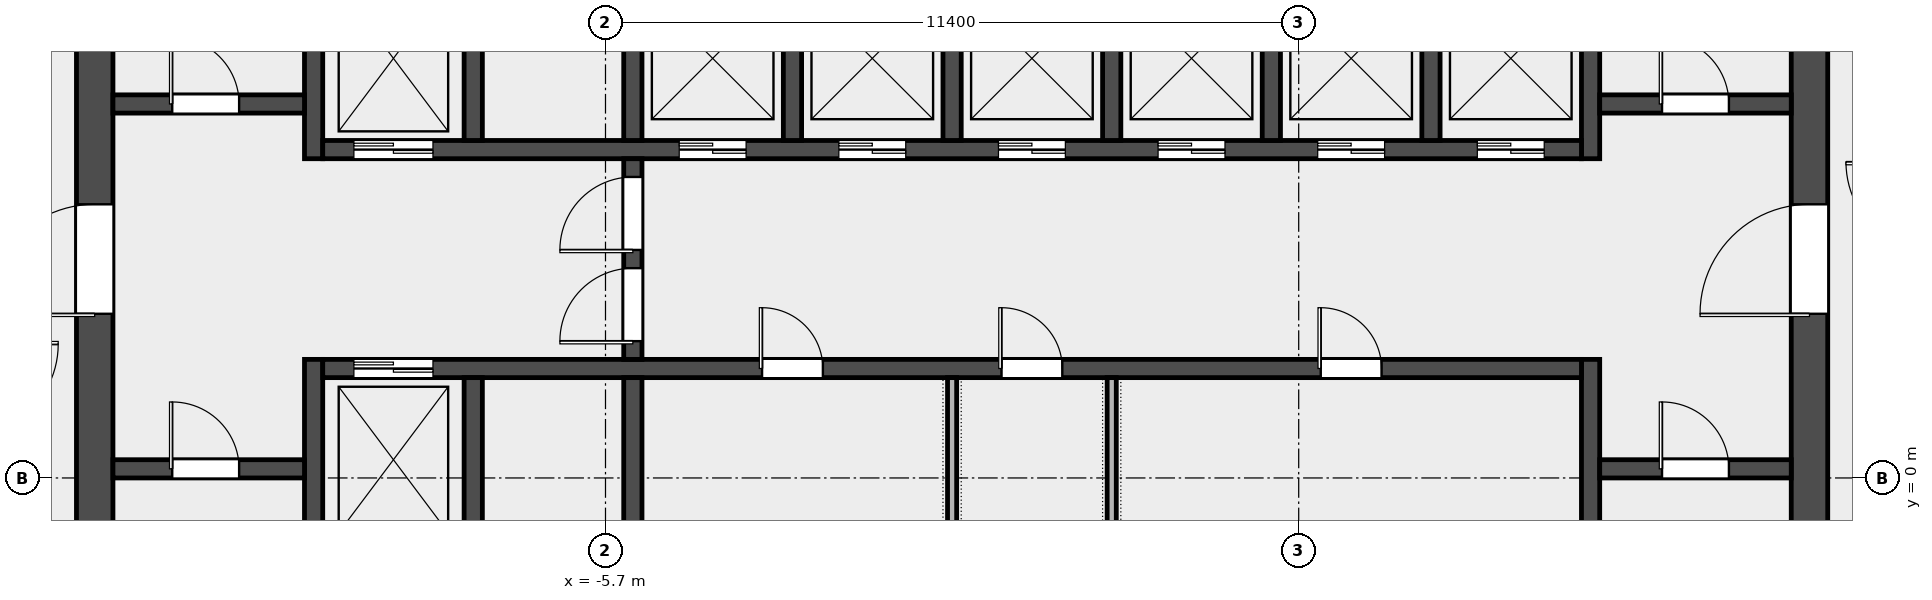
"""IFC4 building model, lengths in metres.
Left out: names, types, materials, properties, quantities, classifications, styles, units other than length and angle.
Written with IfcOpenShell. Run it as: python <this file> out.ifc"""

import sys

from ifc_helpers import new_model, si_unit, direction, frame, frame_2d, origin, place, context, subcontext, project, spatial, rectangle, extrude, element, fill, save


model = new_model("IFC4")
c1 = context("Model", 3, precision=1e-05, world=origin(), true_north=direction((0.0, 1.0)))
c2 = subcontext(c1, "Body", "Model", "MODEL_VIEW")
j1 = project(units=[si_unit("LENGTHUNIT", "METRE"), si_unit("PLANEANGLEUNIT", "RADIAN")], contexts=[c1])
p1 = place(None, origin())
s1 = spatial("IfcSite", under=j1, at=p1, CompositionType="ELEMENT")
p2 = place(p1, origin())
s2 = spatial("IfcBuilding", under=s1, at=p2, CompositionType="ELEMENT")
p3 = place(p2, frame((0.0, 0.0, 311.4)))
s3 = spatial("IfcBuildingStorey", under=s2, at=p3, CompositionType="ELEMENT", Elevation=311.4)
p4 = place(p3, frame((-14.1, -6.6, 0.0), z_axis=(0.0, 0.0, 1.0), x_axis=(0.0, 1.0, 0.0)))
e1 = element("IfcWall", 1, at=p4, inside=s3, PredefinedType="SHEAR", context=c2, shape_type="SweptSolid", body=[
    extrude(rectangle(XDim=19.5, YDim=0.6, at=frame_2d((9.75, 0.0))), origin(), (0.0, 0.0, 1.0), 3.7),
])
p5 = place(p4, frame((9.3, 0.0, 0.0)))
e2 = element("IfcOpeningElement", 2, at=p5, cuts=e1, PredefinedType="OPENING", context=c2, shape_type="SweptSolid", body=[
    extrude(rectangle(XDim=1.8, YDim=2.1, at=frame_2d((0.9, 1.05))), frame((0.0, 0.312, 0.0), z_axis=(0.0, -1.0, 0.0), x_axis=(1.0, 0.0, 0.0)), (0.0, 0.0, 1.0), 0.624),
])
p6 = place(p3, frame((14.1, -6.6, 0.0), z_axis=(0.0, 0.0, 1.0), x_axis=(0.0, 1.0, 0.0)))
e3 = element("IfcWall", 3, at=p6, inside=s3, PredefinedType="SHEAR", context=c2, shape_type="SweptSolid", body=[
    extrude(rectangle(XDim=19.5, YDim=0.6, at=frame_2d((9.75, 0.0))), origin(), (0.0, 0.0, 1.0), 3.7),
])
p7 = place(p6, frame((9.3, 0.0, 0.0)))
e4 = element("IfcOpeningElement", 4, at=p7, cuts=e3, PredefinedType="OPENING", context=c2, shape_type="SweptSolid", body=[
    extrude(rectangle(XDim=1.8, YDim=2.1, at=frame_2d((0.9, 1.05))), frame((0.0, 0.312, 0.0), z_axis=(0.0, -1.0, 0.0), x_axis=(1.0, 0.0, 0.0)), (0.0, 0.0, 1.0), 0.624),
])
p8 = place(p3, frame((-10.5, -6.6, 0.0), z_axis=(0.0, 0.0, 1.0), x_axis=(0.0, 1.0, 0.0)))
e5 = element("IfcWall", 5, at=p8, inside=s3, PredefinedType="SHEAR", context=c2, shape_type="SweptSolid", body=[
    extrude(rectangle(XDim=8.55, YDim=0.3, at=frame_2d((4.275, 0.0))), origin(), (0.0, 0.0, 1.0), 3.7),
])
p9 = place(p3, frame((-10.5, 5.25, 0.0), z_axis=(0.0, 0.0, 1.0), x_axis=(0.0, 1.0, 0.0)))
e6 = element("IfcWall", 6, at=p9, inside=s3, PredefinedType="SHEAR", context=c2, shape_type="SweptSolid", body=[
    extrude(rectangle(XDim=7.65, YDim=0.3, at=frame_2d((3.825, 0.0))), origin(), (0.0, 0.0, 1.0), 3.7),
])
p10 = place(p3, frame((10.5, -6.6, 0.0), z_axis=(0.0, 0.0, 1.0), x_axis=(0.0, 1.0, 0.0)))
e7 = element("IfcWall", 7, at=p10, inside=s3, PredefinedType="SHEAR", context=c2, shape_type="SweptSolid", body=[
    extrude(rectangle(XDim=8.55, YDim=0.3, at=frame_2d((4.275, 0.0))), origin(), (0.0, 0.0, 1.0), 3.7),
])
p11 = place(p3, frame((10.5, 5.25, 0.0), z_axis=(0.0, 0.0, 1.0), x_axis=(0.0, 1.0, 0.0)))
e8 = element("IfcWall", 8, at=p11, inside=s3, PredefinedType="SHEAR", context=c2, shape_type="SweptSolid", body=[
    extrude(rectangle(XDim=7.65, YDim=0.3, at=frame_2d((3.825, 0.0))), origin(), (0.0, 0.0, 1.0), 3.7),
])
p12 = place(p3, frame((-13.8, 0.15, 0.0), z_axis=(0.0, 0.0, 1.0), x_axis=(1.0, 0.0, 0.0)))
e9 = element("IfcWall", 9, at=p12, inside=s3, PredefinedType="SOLIDWALL", context=c2, shape_type="SweptSolid", body=[
    extrude(rectangle(XDim=3.15, YDim=0.3, at=frame_2d((1.575, 0.0))), origin(), (0.0, 0.0, 1.0), 3.7),
])
p13 = place(p12, frame((0.975, 0.0, 0.0)))
e10 = element("IfcOpeningElement", 10, at=p13, cuts=e9, PredefinedType="OPENING", context=c2, shape_type="SweptSolid", body=[
    extrude(rectangle(XDim=1.1, YDim=2.1, at=frame_2d((0.55, 1.05))), frame((0.0, 0.162, 0.0), z_axis=(0.0, -1.0, 0.0), x_axis=(1.0, 0.0, 0.0)), (0.0, 0.0, 1.0), 0.324),
])
p14 = place(p3, frame((-13.8, 6.15, 0.0), z_axis=(0.0, 0.0, 1.0), x_axis=(1.0, 0.0, 0.0)))
e11 = element("IfcWall", 11, at=p14, inside=s3, PredefinedType="SOLIDWALL", context=c2, shape_type="SweptSolid", body=[
    extrude(rectangle(XDim=3.15, YDim=0.3, at=frame_2d((1.575, 0.0))), origin(), (0.0, 0.0, 1.0), 3.7),
])
p15 = place(p14, frame((0.975, 0.0, 0.0)))
e12 = element("IfcOpeningElement", 12, at=p15, cuts=e11, PredefinedType="OPENING", context=c2, shape_type="SweptSolid", body=[
    extrude(rectangle(XDim=1.1, YDim=2.1, at=frame_2d((0.55, 1.05))), frame((0.0, 0.162, 0.0), z_axis=(0.0, -1.0, 0.0), x_axis=(1.0, 0.0, 0.0)), (0.0, 0.0, 1.0), 0.324),
])
p16 = place(p3, frame((10.65, 0.15, 0.0), z_axis=(0.0, 0.0, 1.0), x_axis=(1.0, 0.0, 0.0)))
e13 = element("IfcWall", 13, at=p16, inside=s3, PredefinedType="SOLIDWALL", context=c2, shape_type="SweptSolid", body=[
    extrude(rectangle(XDim=3.15, YDim=0.3, at=frame_2d((1.575, 0.0))), origin(), (0.0, 0.0, 1.0), 3.7),
])
p17 = place(p16, frame((1.025, 0.0, 0.0)))
e14 = element("IfcOpeningElement", 14, at=p17, cuts=e13, PredefinedType="OPENING", context=c2, shape_type="SweptSolid", body=[
    extrude(rectangle(XDim=1.1, YDim=2.1, at=frame_2d((0.55, 1.05))), frame((0.0, 0.162, 0.0), z_axis=(0.0, -1.0, 0.0), x_axis=(1.0, 0.0, 0.0)), (0.0, 0.0, 1.0), 0.324),
])
p18 = place(p3, frame((10.65, 6.15, 0.0), z_axis=(0.0, 0.0, 1.0), x_axis=(1.0, 0.0, 0.0)))
e15 = element("IfcWall", 15, at=p18, inside=s3, PredefinedType="SOLIDWALL", context=c2, shape_type="SweptSolid", body=[
    extrude(rectangle(XDim=3.15, YDim=0.3, at=frame_2d((1.575, 0.0))), origin(), (0.0, 0.0, 1.0), 3.7),
])
p19 = place(p18, frame((1.025, 0.0, 0.0)))
e16 = element("IfcOpeningElement", 16, at=p19, cuts=e15, PredefinedType="OPENING", context=c2, shape_type="SweptSolid", body=[
    extrude(rectangle(XDim=1.1, YDim=2.1, at=frame_2d((0.55, 1.05))), frame((0.0, 0.162, 0.0), z_axis=(0.0, -1.0, 0.0), x_axis=(1.0, 0.0, 0.0)), (0.0, 0.0, 1.0), 0.324),
])
p20 = place(p3, frame((-10.35, 1.8, 0.0), z_axis=(0.0, 0.0, 1.0), x_axis=(1.0, 0.0, 0.0)))
e17 = element("IfcWall", 17, at=p20, inside=s3, PredefinedType="SOLIDWALL", context=c2, shape_type="SweptSolid", body=[
    extrude(rectangle(XDim=20.7, YDim=0.3, at=frame_2d((10.35, 0.0))), origin(), (0.0, 0.0, 1.0), 3.7),
])
p21 = place(p20, frame((0.512, 0.0, 0.0)))
e18 = element("IfcOpeningElement", 18, at=p21, cuts=e17, PredefinedType="OPENING", context=c2, shape_type="SweptSolid", body=[
    extrude(rectangle(XDim=1.3, YDim=2.1, at=frame_2d((0.65, 1.05))), frame((0.0, 0.162, 0.0), z_axis=(0.0, -1.0, 0.0), x_axis=(1.0, 0.0, 0.0)), (0.0, 0.0, 1.0), 0.324),
])
p22 = place(p20, frame((7.225, 0.0, 0.0)))
e19 = element("IfcOpeningElement", 19, at=p22, cuts=e17, PredefinedType="OPENING", context=c2, shape_type="SweptSolid", body=[
    extrude(rectangle(XDim=1.0, YDim=2.1, at=frame_2d((0.5, 1.05))), frame((0.0, 0.162, 0.0), z_axis=(0.0, -1.0, 0.0), x_axis=(1.0, 0.0, 0.0)), (0.0, 0.0, 1.0), 0.324),
])
p23 = place(p20, frame((11.163, 0.0, 0.0)))
e20 = element("IfcOpeningElement", 20, at=p23, cuts=e17, PredefinedType="OPENING", context=c2, shape_type="SweptSolid", body=[
    extrude(rectangle(XDim=1.0, YDim=2.1, at=frame_2d((0.5, 1.05))), frame((0.0, 0.162, 0.0), z_axis=(0.0, -1.0, 0.0), x_axis=(1.0, 0.0, 0.0)), (0.0, 0.0, 1.0), 0.324),
])
p24 = place(p20, frame((16.413, 0.0, 0.0)))
e21 = element("IfcOpeningElement", 21, at=p24, cuts=e17, PredefinedType="OPENING", context=c2, shape_type="SweptSolid", body=[
    extrude(rectangle(XDim=1.0, YDim=2.1, at=frame_2d((0.5, 1.05))), frame((0.0, 0.162, 0.0), z_axis=(0.0, -1.0, 0.0), x_axis=(1.0, 0.0, 0.0)), (0.0, 0.0, 1.0), 0.324),
])
p25 = place(p3, frame((-10.35, 5.4, 0.0), z_axis=(0.0, 0.0, 1.0), x_axis=(1.0, 0.0, 0.0)))
e22 = element("IfcWall", 22, at=p25, inside=s3, PredefinedType="SOLIDWALL", context=c2, shape_type="SweptSolid", body=[
    extrude(rectangle(XDim=20.7, YDim=0.3, at=frame_2d((10.35, 0.0))), origin(), (0.0, 0.0, 1.0), 3.7),
])
p26 = place(p25, frame((0.512, 0.0, 0.0)))
e23 = element("IfcOpeningElement", 23, at=p26, cuts=e22, PredefinedType="OPENING", context=c2, shape_type="SweptSolid", body=[
    extrude(rectangle(XDim=1.3, YDim=2.1, at=frame_2d((0.65, 1.05))), frame((0.0, 0.162, 0.0), z_axis=(0.0, -1.0, 0.0), x_axis=(1.0, 0.0, 0.0)), (0.0, 0.0, 1.0), 0.324),
])
p27 = place(p25, frame((5.863, 0.0, 0.0)))
e24 = element("IfcOpeningElement", 24, at=p27, cuts=e22, PredefinedType="OPENING", context=c2, shape_type="SweptSolid", body=[
    extrude(rectangle(XDim=1.1, YDim=2.1, at=frame_2d((0.55, 1.05))), frame((0.0, 0.162, 0.0), z_axis=(0.0, -1.0, 0.0), x_axis=(1.0, 0.0, 0.0)), (0.0, 0.0, 1.0), 0.324),
])
p28 = place(p25, frame((8.488, 0.0, 0.0)))
e25 = element("IfcOpeningElement", 25, at=p28, cuts=e22, PredefinedType="OPENING", context=c2, shape_type="SweptSolid", body=[
    extrude(rectangle(XDim=1.1, YDim=2.1, at=frame_2d((0.55, 1.05))), frame((0.0, 0.162, 0.0), z_axis=(0.0, -1.0, 0.0), x_axis=(1.0, 0.0, 0.0)), (0.0, 0.0, 1.0), 0.324),
])
p29 = place(p25, frame((11.113, 0.0, 0.0)))
e26 = element("IfcOpeningElement", 26, at=p29, cuts=e22, PredefinedType="OPENING", context=c2, shape_type="SweptSolid", body=[
    extrude(rectangle(XDim=1.1, YDim=2.1, at=frame_2d((0.55, 1.05))), frame((0.0, 0.162, 0.0), z_axis=(0.0, -1.0, 0.0), x_axis=(1.0, 0.0, 0.0)), (0.0, 0.0, 1.0), 0.324),
])
p30 = place(p25, frame((13.738, 0.0, 0.0)))
e27 = element("IfcOpeningElement", 27, at=p30, cuts=e22, PredefinedType="OPENING", context=c2, shape_type="SweptSolid", body=[
    extrude(rectangle(XDim=1.1, YDim=2.1, at=frame_2d((0.55, 1.05))), frame((0.0, 0.162, 0.0), z_axis=(0.0, -1.0, 0.0), x_axis=(1.0, 0.0, 0.0)), (0.0, 0.0, 1.0), 0.324),
])
p31 = place(p25, frame((16.363, 0.0, 0.0)))
e28 = element("IfcOpeningElement", 28, at=p31, cuts=e22, PredefinedType="OPENING", context=c2, shape_type="SweptSolid", body=[
    extrude(rectangle(XDim=1.1, YDim=2.1, at=frame_2d((0.55, 1.05))), frame((0.0, 0.162, 0.0), z_axis=(0.0, -1.0, 0.0), x_axis=(1.0, 0.0, 0.0)), (0.0, 0.0, 1.0), 0.324),
])
p32 = place(p25, frame((18.988, 0.0, 0.0)))
e29 = element("IfcOpeningElement", 29, at=p32, cuts=e22, PredefinedType="OPENING", context=c2, shape_type="SweptSolid", body=[
    extrude(rectangle(XDim=1.1, YDim=2.1, at=frame_2d((0.55, 1.05))), frame((0.0, 0.162, 0.0), z_axis=(0.0, -1.0, 0.0), x_axis=(1.0, 0.0, 0.0)), (0.0, 0.0, 1.0), 0.324),
])
for number, where, z_axis, x_axis in (
    (30, (-7.875, -1.05, 0.0), (0.0, 0.0, 1.0), (0.0, 1.0, 0.0)),
    (31, (-5.25, -1.05, 0.0), (0.0, 0.0, 1.0), (0.0, 1.0, 0.0)),
    (32, (-7.875, 5.55, 0.0), (0.0, 0.0, 1.0), (0.0, 1.0, 0.0)),
    (33, (-5.25, 5.55, 0.0), (0.0, 0.0, 1.0), (0.0, 1.0, 0.0)),
    (34, (-2.625, 5.55, 0.0), (0.0, 0.0, 1.0), (0.0, 1.0, 0.0)),
    (35, (0.0, 5.55, 0.0), (0.0, 0.0, 1.0), (0.0, 1.0, 0.0)),
    (36, (2.625, 5.55, 0.0), (0.0, 0.0, 1.0), (0.0, 1.0, 0.0)),
    (37, (5.25, 5.55, 0.0), (0.0, 0.0, 1.0), (0.0, 1.0, 0.0)),
    (38, (7.875, 5.55, 0.0), (0.0, 0.0, 1.0), (0.0, 1.0, 0.0)),
):
    element("IfcWall", number, at=place(p3, frame(where, z_axis=z_axis, x_axis=x_axis)), inside=s3, PredefinedType="SOLIDWALL", context=c2, shape_type="SweptSolid", body=[
        extrude(rectangle(XDim=2.7, YDim=0.3, at=frame_2d((1.35, 0.0))), origin(), (0.0, 0.0, 1.0), 3.7),
    ])
p33 = place(p3, frame((-5.25, 1.95, 0.0), z_axis=(0.0, 0.0, 1.0), x_axis=(0.0, 1.0, 0.0)))
e39 = element("IfcWall", 39, at=p33, inside=s3, PredefinedType="SOLIDWALL", context=c2, shape_type="SweptSolid", body=[
    extrude(rectangle(XDim=3.3, YDim=0.3, at=frame_2d((1.65, 0.0))), origin(), (0.0, 0.0, 1.0), 3.7),
])
p34 = place(p33, frame((0.3, 0.0, 0.0)))
e40 = element("IfcOpeningElement", 40, at=p34, cuts=e39, PredefinedType="OPENING", context=c2, shape_type="SweptSolid", body=[
    extrude(rectangle(XDim=1.2, YDim=2.1, at=frame_2d((0.6, 1.05))), frame((0.0, 0.162, 0.0), z_axis=(0.0, -1.0, 0.0), x_axis=(1.0, 0.0, 0.0)), (0.0, 0.0, 1.0), 0.324),
])
p35 = place(p33, frame((1.8, 0.0, 0.0)))
e41 = element("IfcOpeningElement", 41, at=p35, cuts=e39, PredefinedType="OPENING", context=c2, shape_type="SweptSolid", body=[
    extrude(rectangle(XDim=1.2, YDim=2.1, at=frame_2d((0.6, 1.05))), frame((0.0, 0.162, 0.0), z_axis=(0.0, -1.0, 0.0), x_axis=(1.0, 0.0, 0.0)), (0.0, 0.0, 1.0), 0.324),
])
for number, where, z_axis, x_axis in (
    (42, (0.0, -1.05, 0.0), (0.0, 0.0, 1.0), (0.0, 1.0, 0.0)),
    (43, (2.625, -1.05, 0.0), (0.0, 0.0, 1.0), (0.0, 1.0, 0.0)),
):
    element("IfcWall", number, at=place(p3, frame(where, z_axis=z_axis, x_axis=x_axis)), inside=s3, PredefinedType="PARTITIONING", context=c2, shape_type="SweptSolid", body=[
        extrude(rectangle(XDim=2.7, YDim=0.15, at=frame_2d((1.35, 0.0))), origin(), (0.0, 0.0, 1.0), 3.7),
    ])
p36 = place(p13, origin())
e44 = element("IfcDoor", 44, at=p36, inside=s3, OperationType="SINGLE_SWING_LEFT", PredefinedType="DOOR", context=c2, shape_type="SweptSolid", body=[
    extrude(rectangle(XDim=1.1, YDim=2.1, at=frame_2d((0.55, 1.05))), frame((0.0, 0.025, 0.0), z_axis=(0.0, -1.0, 0.0), x_axis=(1.0, 0.0, 0.0)), (0.0, 0.0, 1.0), 0.05),
])
fill(e10, e44)
p37 = place(p15, origin())
e45 = element("IfcDoor", 45, at=p37, inside=s3, OperationType="SINGLE_SWING_LEFT", PredefinedType="DOOR", context=c2, shape_type="SweptSolid", body=[
    extrude(rectangle(XDim=1.1, YDim=2.1, at=frame_2d((0.55, 1.05))), frame((0.0, 0.025, 0.0), z_axis=(0.0, -1.0, 0.0), x_axis=(1.0, 0.0, 0.0)), (0.0, 0.0, 1.0), 0.05),
])
fill(e12, e45)
p38 = place(p17, origin())
e46 = element("IfcDoor", 46, at=p38, inside=s3, OperationType="SINGLE_SWING_RIGHT", PredefinedType="DOOR", context=c2, shape_type="SweptSolid", body=[
    extrude(rectangle(XDim=1.1, YDim=2.1, at=frame_2d((0.55, 1.05))), frame((0.0, 0.025, 0.0), z_axis=(0.0, -1.0, 0.0), x_axis=(1.0, 0.0, 0.0)), (0.0, 0.0, 1.0), 0.05),
])
fill(e14, e46)
p39 = place(p19, origin())
e47 = element("IfcDoor", 47, at=p39, inside=s3, OperationType="SINGLE_SWING_RIGHT", PredefinedType="DOOR", context=c2, shape_type="SweptSolid", body=[
    extrude(rectangle(XDim=1.1, YDim=2.1, at=frame_2d((0.55, 1.05))), frame((0.0, 0.025, 0.0), z_axis=(0.0, -1.0, 0.0), x_axis=(1.0, 0.0, 0.0)), (0.0, 0.0, 1.0), 0.05),
])
fill(e16, e47)
p40 = place(p5, origin())
e48 = element("IfcDoor", 48, at=p40, inside=s3, OperationType="DOUBLE_DOOR_SINGLE_SWING", PredefinedType="DOOR", context=c2, shape_type="SweptSolid", body=[
    extrude(rectangle(XDim=1.8, YDim=2.1, at=frame_2d((0.9, 1.05))), frame((0.0, 0.025, 0.0), z_axis=(0.0, -1.0, 0.0), x_axis=(1.0, 0.0, 0.0)), (0.0, 0.0, 1.0), 0.05),
])
fill(e2, e48)
p41 = place(p7, origin())
e49 = element("IfcDoor", 49, at=p41, inside=s3, OperationType="DOUBLE_DOOR_SINGLE_SWING", PredefinedType="DOOR", context=c2, shape_type="SweptSolid", body=[
    extrude(rectangle(XDim=1.8, YDim=2.1, at=frame_2d((0.9, 1.05))), frame((0.0, 0.025, 0.0), z_axis=(0.0, -1.0, 0.0), x_axis=(1.0, 0.0, 0.0)), (0.0, 0.0, 1.0), 0.05),
])
fill(e4, e49)
p42 = place(p34, origin())
e50 = element("IfcDoor", 50, at=p42, inside=s3, OperationType="SINGLE_SWING_LEFT", PredefinedType="DOOR", context=c2, shape_type="SweptSolid", body=[
    extrude(rectangle(XDim=1.2, YDim=2.1, at=frame_2d((0.6, 1.05))), frame((0.0, 0.025, 0.0), z_axis=(0.0, -1.0, 0.0), x_axis=(1.0, 0.0, 0.0)), (0.0, 0.0, 1.0), 0.05),
])
fill(e40, e50)
p43 = place(p35, origin())
e51 = element("IfcDoor", 51, at=p43, inside=s3, OperationType="SINGLE_SWING_RIGHT", PredefinedType="DOOR", context=c2, shape_type="SweptSolid", body=[
    extrude(rectangle(XDim=1.2, YDim=2.1, at=frame_2d((0.6, 1.05))), frame((0.0, 0.025, 0.0), z_axis=(0.0, -1.0, 0.0), x_axis=(1.0, 0.0, 0.0)), (0.0, 0.0, 1.0), 0.05),
])
fill(e41, e51)
p44 = place(p21, origin())
e52 = element("IfcDoor", 52, at=p44, inside=s3, OperationType="DOUBLE_DOOR_SLIDING", PredefinedType="DOOR", context=c2, shape_type="SweptSolid", body=[
    extrude(rectangle(XDim=1.3, YDim=2.1, at=frame_2d((0.65, 1.05))), frame((0.0, 0.025, 0.0), z_axis=(0.0, -1.0, 0.0), x_axis=(1.0, 0.0, 0.0)), (0.0, 0.0, 1.0), 0.05),
])
fill(e18, e52)
p45 = place(p26, origin())
e53 = element("IfcDoor", 53, at=p45, inside=s3, OperationType="DOUBLE_DOOR_SLIDING", PredefinedType="DOOR", context=c2, shape_type="SweptSolid", body=[
    extrude(rectangle(XDim=1.3, YDim=2.1, at=frame_2d((0.65, 1.05))), frame((0.0, 0.025, 0.0), z_axis=(0.0, -1.0, 0.0), x_axis=(1.0, 0.0, 0.0)), (0.0, 0.0, 1.0), 0.05),
])
fill(e23, e53)
p46 = place(p27, origin())
e54 = element("IfcDoor", 54, at=p46, inside=s3, OperationType="DOUBLE_DOOR_SLIDING", PredefinedType="DOOR", context=c2, shape_type="SweptSolid", body=[
    extrude(rectangle(XDim=1.1, YDim=2.1, at=frame_2d((0.55, 1.05))), frame((0.0, 0.025, 0.0), z_axis=(0.0, -1.0, 0.0), x_axis=(1.0, 0.0, 0.0)), (0.0, 0.0, 1.0), 0.05),
])
fill(e24, e54)
p47 = place(p28, origin())
e55 = element("IfcDoor", 55, at=p47, inside=s3, OperationType="DOUBLE_DOOR_SLIDING", PredefinedType="DOOR", context=c2, shape_type="SweptSolid", body=[
    extrude(rectangle(XDim=1.1, YDim=2.1, at=frame_2d((0.55, 1.05))), frame((0.0, 0.025, 0.0), z_axis=(0.0, -1.0, 0.0), x_axis=(1.0, 0.0, 0.0)), (0.0, 0.0, 1.0), 0.05),
])
fill(e25, e55)
p48 = place(p29, origin())
e56 = element("IfcDoor", 56, at=p48, inside=s3, OperationType="DOUBLE_DOOR_SLIDING", PredefinedType="DOOR", context=c2, shape_type="SweptSolid", body=[
    extrude(rectangle(XDim=1.1, YDim=2.1, at=frame_2d((0.55, 1.05))), frame((0.0, 0.025, 0.0), z_axis=(0.0, -1.0, 0.0), x_axis=(1.0, 0.0, 0.0)), (0.0, 0.0, 1.0), 0.05),
])
fill(e26, e56)
p49 = place(p30, origin())
e57 = element("IfcDoor", 57, at=p49, inside=s3, OperationType="DOUBLE_DOOR_SLIDING", PredefinedType="DOOR", context=c2, shape_type="SweptSolid", body=[
    extrude(rectangle(XDim=1.1, YDim=2.1, at=frame_2d((0.55, 1.05))), frame((0.0, 0.025, 0.0), z_axis=(0.0, -1.0, 0.0), x_axis=(1.0, 0.0, 0.0)), (0.0, 0.0, 1.0), 0.05),
])
fill(e27, e57)
p50 = place(p31, origin())
e58 = element("IfcDoor", 58, at=p50, inside=s3, OperationType="DOUBLE_DOOR_SLIDING", PredefinedType="DOOR", context=c2, shape_type="SweptSolid", body=[
    extrude(rectangle(XDim=1.1, YDim=2.1, at=frame_2d((0.55, 1.05))), frame((0.0, 0.025, 0.0), z_axis=(0.0, -1.0, 0.0), x_axis=(1.0, 0.0, 0.0)), (0.0, 0.0, 1.0), 0.05),
])
fill(e28, e58)
p51 = place(p32, origin())
e59 = element("IfcDoor", 59, at=p51, inside=s3, OperationType="DOUBLE_DOOR_SLIDING", PredefinedType="DOOR", context=c2, shape_type="SweptSolid", body=[
    extrude(rectangle(XDim=1.1, YDim=2.1, at=frame_2d((0.55, 1.05))), frame((0.0, 0.025, 0.0), z_axis=(0.0, -1.0, 0.0), x_axis=(1.0, 0.0, 0.0)), (0.0, 0.0, 1.0), 0.05),
])
fill(e29, e59)
p52 = place(p22, origin())
e60 = element("IfcDoor", 60, at=p52, inside=s3, OperationType="SINGLE_SWING_LEFT", PredefinedType="DOOR", context=c2, shape_type="SweptSolid", body=[
    extrude(rectangle(XDim=1.0, YDim=2.1, at=frame_2d((0.5, 1.05))), frame((0.0, 0.025, 0.0), z_axis=(0.0, -1.0, 0.0), x_axis=(1.0, 0.0, 0.0)), (0.0, 0.0, 1.0), 0.05),
])
fill(e19, e60)
p53 = place(p23, origin())
e61 = element("IfcDoor", 61, at=p53, inside=s3, OperationType="SINGLE_SWING_LEFT", PredefinedType="DOOR", context=c2, shape_type="SweptSolid", body=[
    extrude(rectangle(XDim=1.0, YDim=2.1, at=frame_2d((0.5, 1.05))), frame((0.0, 0.025, 0.0), z_axis=(0.0, -1.0, 0.0), x_axis=(1.0, 0.0, 0.0)), (0.0, 0.0, 1.0), 0.05),
])
fill(e20, e61)
p54 = place(p24, origin())
e62 = element("IfcDoor", 62, at=p54, inside=s3, OperationType="SINGLE_SWING_LEFT", PredefinedType="DOOR", context=c2, shape_type="SweptSolid", body=[
    extrude(rectangle(XDim=1.0, YDim=2.1, at=frame_2d((0.5, 1.05))), frame((0.0, 0.025, 0.0), z_axis=(0.0, -1.0, 0.0), x_axis=(1.0, 0.0, 0.0)), (0.0, 0.0, 1.0), 0.05),
])
fill(e21, e62)
save(model, sys.argv[1])
